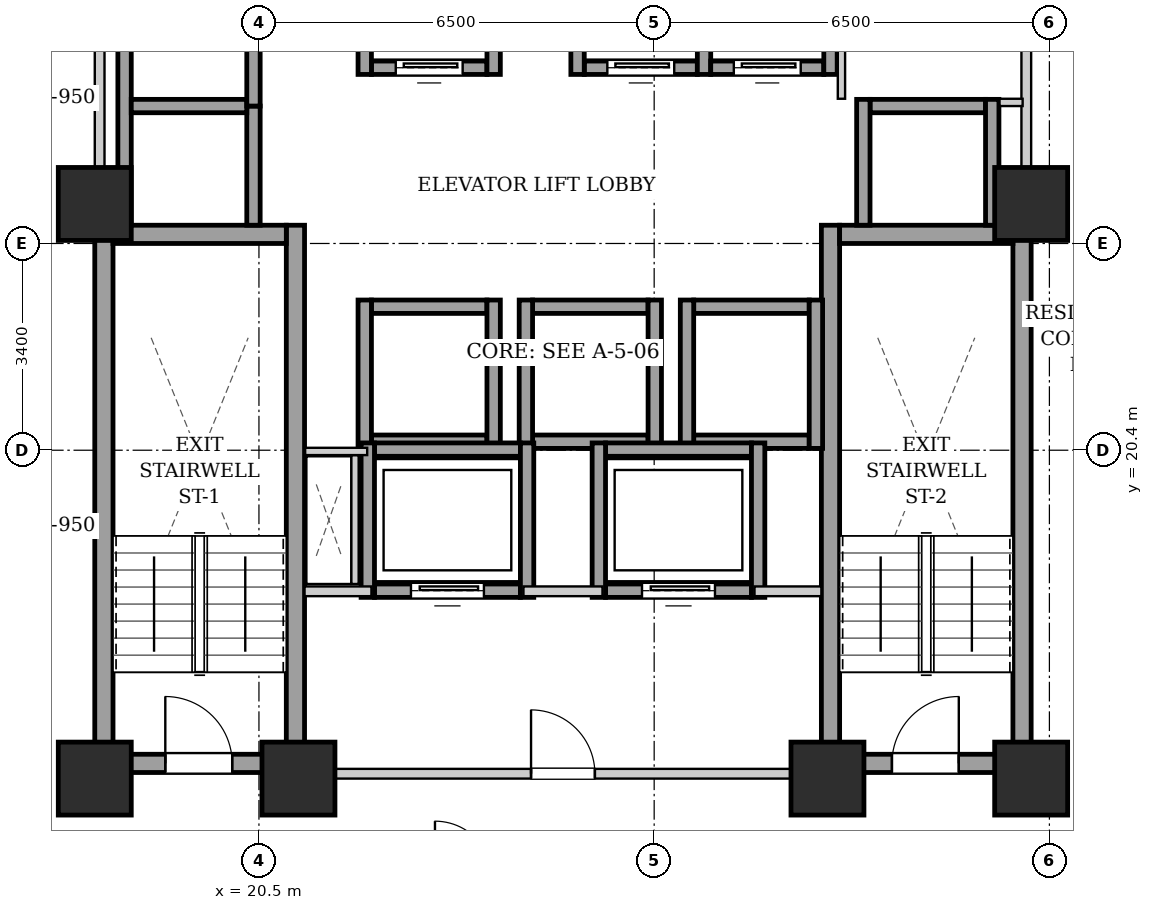
"""IFC4 building model, lengths in metres.
Left out: names, types, materials, properties, quantities, classifications, styles, units other than length and angle.
Written with IfcOpenShell. Run it as: python <this file> out.ifc"""

import sys

from ifc_helpers import new_model, si_unit, direction, frame, frame_2d, origin, origin_2d, place, context, subcontext, project, spatial, rectangle, extrude, element, fill, save


model = new_model("IFC4")
c1 = context("Model", 3, precision=1e-05, world=origin(), true_north=direction((0.0, 1.0)))
c2 = subcontext(c1, "Body", "Model", "MODEL_VIEW")
j1 = project(units=[si_unit("LENGTHUNIT", "METRE"), si_unit("PLANEANGLEUNIT", "RADIAN")], contexts=[c1])
p1 = place(None, origin())
s1 = spatial("IfcSite", under=j1, at=p1, CompositionType="ELEMENT")
p2 = place(p1, origin())
s2 = spatial("IfcBuilding", under=s1, at=p2, CompositionType="ELEMENT")
p3 = place(p2, frame((0.0, 0.0, 45.0)))
s3 = spatial("IfcBuildingStorey", under=s2, at=p3, CompositionType="ELEMENT", Elevation=45.0)
for number, where, z_axis, x_axis in (
    (1, (17.8, 15.0, 0.0), (0.0, 0.0, 1.0), (1.0, 0.0, 0.0)),
    (2, (21.15, 15.0, 0.0), (0.0, 0.0, 1.0), (1.0, 0.0, 0.0)),
    (3, (29.85, 15.0, 0.0), (0.0, 0.0, 1.0), (1.0, 0.0, 0.0)),
    (4, (33.2, 15.0, 0.0), (0.0, 0.0, 1.0), (1.0, 0.0, 0.0)),
    (5, (17.8, 24.45, 0.0), (0.0, 0.0, 1.0), (1.0, 0.0, 0.0)),
    (6, (33.2, 24.45, 0.0), (0.0, 0.0, 1.0), (1.0, 0.0, 0.0)),
):
    element("IfcColumn", number, at=place(p3, frame(where, z_axis=z_axis, x_axis=x_axis)), inside=s3, PredefinedType="COLUMN", context=c2, shape_type="SweptSolid", body=[
        extrude(rectangle(XDim=1.2, YDim=1.2, at=origin_2d()), origin(), (0.0, 0.0, 1.0), 3.2),
    ])
for number, where, z_axis, x_axis in (
    (7, (17.95, 15.1, 0.0), (0.0, 0.0, 1.0), (0.0, 1.0, 0.0)),
    (8, (21.1, 15.1, 0.0), (0.0, 0.0, 1.0), (0.0, 1.0, 0.0)),
):
    element("IfcWall", number, at=place(p3, frame(where, z_axis=z_axis, x_axis=x_axis)), inside=s3, PredefinedType="SHEAR", context=c2, shape_type="SweptSolid", body=[
        extrude(rectangle(XDim=9.0, YDim=0.3, at=frame_2d((4.5, 0.0))), origin(), (0.0, 0.0, 1.0), 2.94),
    ])
p4 = place(p3, frame((18.1, 23.95, 0.0), z_axis=(0.0, 0.0, 1.0), x_axis=(1.0, 0.0, 0.0)))
e9 = element("IfcWall", 9, at=p4, inside=s3, PredefinedType="SHEAR", context=c2, shape_type="SweptSolid", body=[
    extrude(rectangle(XDim=2.85, YDim=0.3, at=frame_2d((1.425, 0.0))), origin(), (0.0, 0.0, 1.0), 2.94),
])
p5 = place(p3, frame((18.1, 15.25, 0.0), z_axis=(0.0, 0.0, 1.0), x_axis=(1.0, 0.0, 0.0)))
e10 = element("IfcWall", 10, at=p5, inside=s3, PredefinedType="SHEAR", context=c2, shape_type="SweptSolid", body=[
    extrude(rectangle(XDim=2.85, YDim=0.3, at=frame_2d((1.425, 0.0))), origin(), (0.0, 0.0, 1.0), 2.94),
])
p6 = place(p5, frame((0.86, 0.0, 0.0)))
e11 = element("IfcOpeningElement", 11, at=p6, cuts=e10, PredefinedType="OPENING", context=c2, shape_type="SweptSolid", body=[
    extrude(rectangle(XDim=1.1, YDim=2.05, at=frame_2d((0.55, 1.025))), frame((0.0, 0.16, 0.0), z_axis=(0.0, -1.0, 0.0), x_axis=(1.0, 0.0, 0.0)), (0.0, 0.0, 1.0), 0.32),
])
for number, where, z_axis, x_axis in (
    (12, (29.9, 15.1, 0.0), (0.0, 0.0, 1.0), (0.0, 1.0, 0.0)),
    (13, (33.05, 15.1, 0.0), (0.0, 0.0, 1.0), (0.0, 1.0, 0.0)),
):
    element("IfcWall", number, at=place(p3, frame(where, z_axis=z_axis, x_axis=x_axis)), inside=s3, PredefinedType="SHEAR", context=c2, shape_type="SweptSolid", body=[
        extrude(rectangle(XDim=9.0, YDim=0.3, at=frame_2d((4.5, 0.0))), origin(), (0.0, 0.0, 1.0), 2.94),
    ])
p7 = place(p3, frame((30.05, 23.95, 0.0), z_axis=(0.0, 0.0, 1.0), x_axis=(1.0, 0.0, 0.0)))
e14 = element("IfcWall", 14, at=p7, inside=s3, PredefinedType="SHEAR", context=c2, shape_type="SweptSolid", body=[
    extrude(rectangle(XDim=2.85, YDim=0.3, at=frame_2d((1.425, 0.0))), origin(), (0.0, 0.0, 1.0), 2.94),
])
p8 = place(p3, frame((30.05, 15.25, 0.0), z_axis=(0.0, 0.0, 1.0), x_axis=(1.0, 0.0, 0.0)))
e15 = element("IfcWall", 15, at=p8, inside=s3, PredefinedType="SHEAR", context=c2, shape_type="SweptSolid", body=[
    extrude(rectangle(XDim=2.85, YDim=0.3, at=frame_2d((1.425, 0.0))), origin(), (0.0, 0.0, 1.0), 2.94),
])
p9 = place(p8, frame((0.86, 0.0, 0.0)))
e16 = element("IfcOpeningElement", 16, at=p9, cuts=e15, PredefinedType="OPENING", context=c2, shape_type="SweptSolid", body=[
    extrude(rectangle(XDim=1.1, YDim=2.05, at=frame_2d((0.55, 1.025))), frame((0.0, 0.16, 0.0), z_axis=(0.0, -1.0, 0.0), x_axis=(1.0, 0.0, 0.0)), (0.0, 0.0, 1.0), 0.32),
])
p10 = place(p3, frame((22.35, 26.69, 0.0), z_axis=(0.0, 0.0, 1.0), x_axis=(1.0, 0.0, 0.0)))
e17 = element("IfcWall", 17, at=p10, inside=s3, PredefinedType="SHEAR", context=c2, shape_type="SweptSolid", body=[
    extrude(rectangle(XDim=1.9, YDim=0.22, at=frame_2d((0.95, 0.0))), origin(), (0.0, 0.0, 1.0), 2.94),
])
p11 = place(p10, frame((0.4, 0.0, 0.0)))
e18 = element("IfcOpeningElement", 18, at=p11, cuts=e17, PredefinedType="OPENING", context=c2, shape_type="SweptSolid", body=[
    extrude(rectangle(XDim=1.1, YDim=2.15, at=frame_2d((0.55, 1.075))), frame((0.0, 0.12, 0.0), z_axis=(0.0, -1.0, 0.0), x_axis=(1.0, 0.0, 0.0)), (0.0, 0.0, 1.0), 0.24),
])
for number, where, z_axis, x_axis in (
    (19, (22.24, 26.58, 0.0), (0.0, 0.0, 1.0), (0.0, 1.0, 0.0)),
    (20, (24.36, 26.58, 0.0), (0.0, 0.0, 1.0), (0.0, 1.0, 0.0)),
):
    element("IfcWall", number, at=place(p3, frame(where, z_axis=z_axis, x_axis=x_axis)), inside=s3, PredefinedType="SHEAR", context=c2, shape_type="SweptSolid", body=[
        extrude(rectangle(XDim=2.44, YDim=0.22, at=frame_2d((1.22, 0.0))), origin(), (0.0, 0.0, 1.0), 2.94),
    ])
p12 = place(p3, frame((25.85, 26.69, 0.0), z_axis=(0.0, 0.0, 1.0), x_axis=(1.0, 0.0, 0.0)))
e21 = element("IfcWall", 21, at=p12, inside=s3, PredefinedType="SHEAR", context=c2, shape_type="SweptSolid", body=[
    extrude(rectangle(XDim=1.86, YDim=0.22, at=frame_2d((0.93, 0.0))), origin(), (0.0, 0.0, 1.0), 2.94),
])
p13 = place(p12, frame((0.38, 0.0, 0.0)))
e22 = element("IfcOpeningElement", 22, at=p13, cuts=e21, PredefinedType="OPENING", context=c2, shape_type="SweptSolid", body=[
    extrude(rectangle(XDim=1.1, YDim=2.15, at=frame_2d((0.55, 1.075))), frame((0.0, 0.12, 0.0), z_axis=(0.0, -1.0, 0.0), x_axis=(1.0, 0.0, 0.0)), (0.0, 0.0, 1.0), 0.24),
])
for number, where, z_axis, x_axis in (
    (23, (25.74, 26.58, 0.0), (0.0, 0.0, 1.0), (0.0, 1.0, 0.0)),
    (24, (27.82, 26.58, 0.0), (0.0, 0.0, 1.0), (0.0, 1.0, 0.0)),
):
    element("IfcWall", number, at=place(p3, frame(where, z_axis=z_axis, x_axis=x_axis)), inside=s3, PredefinedType="SHEAR", context=c2, shape_type="SweptSolid", body=[
        extrude(rectangle(XDim=2.44, YDim=0.22, at=frame_2d((1.22, 0.0))), origin(), (0.0, 0.0, 1.0), 2.94),
    ])
p14 = place(p3, frame((27.93, 26.69, 0.0), z_axis=(0.0, 0.0, 1.0), x_axis=(1.0, 0.0, 0.0)))
e25 = element("IfcWall", 25, at=p14, inside=s3, PredefinedType="SHEAR", context=c2, shape_type="SweptSolid", body=[
    extrude(rectangle(XDim=1.86, YDim=0.22, at=frame_2d((0.93, 0.0))), origin(), (0.0, 0.0, 1.0), 2.94),
])
p15 = place(p14, frame((0.38, 0.0, 0.0)))
e26 = element("IfcOpeningElement", 26, at=p15, cuts=e25, PredefinedType="OPENING", context=c2, shape_type="SweptSolid", body=[
    extrude(rectangle(XDim=1.1, YDim=2.15, at=frame_2d((0.55, 1.075))), frame((0.0, 0.12, 0.0), z_axis=(0.0, -1.0, 0.0), x_axis=(1.0, 0.0, 0.0)), (0.0, 0.0, 1.0), 0.24),
])
p16 = place(p3, frame((29.9, 26.58, 0.0), z_axis=(0.0, 0.0, 1.0), x_axis=(0.0, 1.0, 0.0)))
e27 = element("IfcWall", 27, at=p16, inside=s3, PredefinedType="SHEAR", context=c2, shape_type="SweptSolid", body=[
    extrude(rectangle(XDim=2.44, YDim=0.22, at=frame_2d((1.22, 0.0))), origin(), (0.0, 0.0, 1.0), 2.94),
])
for number, where, z_axis, x_axis in (
    (28, (22.35, 20.54, 0.0), (0.0, 0.0, 1.0), (1.0, 0.0, 0.0)),
    (29, (22.35, 22.76, 0.0), (0.0, 0.0, 1.0), (1.0, 0.0, 0.0)),
):
    element("IfcWall", number, at=place(p3, frame(where, z_axis=z_axis, x_axis=x_axis)), inside=s3, PredefinedType="SHEAR", context=c2, shape_type="SweptSolid", body=[
        extrude(rectangle(XDim=1.9, YDim=0.22, at=frame_2d((0.95, 0.0))), origin(), (0.0, 0.0, 1.0), 2.94),
    ])
for number, where, z_axis, x_axis in (
    (30, (22.24, 20.43, 0.0), (0.0, 0.0, 1.0), (0.0, 1.0, 0.0)),
    (31, (24.36, 20.43, 0.0), (0.0, 0.0, 1.0), (0.0, 1.0, 0.0)),
):
    element("IfcWall", number, at=place(p3, frame(where, z_axis=z_axis, x_axis=x_axis)), inside=s3, PredefinedType="SHEAR", context=c2, shape_type="SweptSolid", body=[
        extrude(rectangle(XDim=2.44, YDim=0.22, at=frame_2d((1.22, 0.0))), origin(), (0.0, 0.0, 1.0), 2.94),
    ])
for number, where, z_axis, x_axis in (
    (32, (25.0, 20.54, 0.0), (0.0, 0.0, 1.0), (1.0, 0.0, 0.0)),
    (33, (25.0, 22.76, 0.0), (0.0, 0.0, 1.0), (1.0, 0.0, 0.0)),
):
    element("IfcWall", number, at=place(p3, frame(where, z_axis=z_axis, x_axis=x_axis)), inside=s3, PredefinedType="SHEAR", context=c2, shape_type="SweptSolid", body=[
        extrude(rectangle(XDim=1.9, YDim=0.22, at=frame_2d((0.95, 0.0))), origin(), (0.0, 0.0, 1.0), 2.94),
    ])
for number, where, z_axis, x_axis in (
    (34, (24.89, 20.43, 0.0), (0.0, 0.0, 1.0), (0.0, 1.0, 0.0)),
    (35, (27.01, 20.43, 0.0), (0.0, 0.0, 1.0), (0.0, 1.0, 0.0)),
):
    element("IfcWall", number, at=place(p3, frame(where, z_axis=z_axis, x_axis=x_axis)), inside=s3, PredefinedType="SHEAR", context=c2, shape_type="SweptSolid", body=[
        extrude(rectangle(XDim=2.44, YDim=0.22, at=frame_2d((1.22, 0.0))), origin(), (0.0, 0.0, 1.0), 2.94),
    ])
for number, where, z_axis, x_axis in (
    (36, (27.65, 20.54, 0.0), (0.0, 0.0, 1.0), (1.0, 0.0, 0.0)),
    (37, (27.65, 22.76, 0.0), (0.0, 0.0, 1.0), (1.0, 0.0, 0.0)),
):
    element("IfcWall", number, at=place(p3, frame(where, z_axis=z_axis, x_axis=x_axis)), inside=s3, PredefinedType="SHEAR", context=c2, shape_type="SweptSolid", body=[
        extrude(rectangle(XDim=1.9, YDim=0.22, at=frame_2d((0.95, 0.0))), origin(), (0.0, 0.0, 1.0), 2.94),
    ])
for number, where, z_axis, x_axis in (
    (38, (27.54, 20.43, 0.0), (0.0, 0.0, 1.0), (0.0, 1.0, 0.0)),
    (39, (29.66, 20.43, 0.0), (0.0, 0.0, 1.0), (0.0, 1.0, 0.0)),
):
    element("IfcWall", number, at=place(p3, frame(where, z_axis=z_axis, x_axis=x_axis)), inside=s3, PredefinedType="SHEAR", context=c2, shape_type="SweptSolid", body=[
        extrude(rectangle(XDim=2.44, YDim=0.22, at=frame_2d((1.22, 0.0))), origin(), (0.0, 0.0, 1.0), 2.94),
    ])
p17 = place(p3, frame((18.29, 24.1, 0.0), z_axis=(0.0, 0.0, 1.0), x_axis=(0.0, 1.0, 0.0)))
e40 = element("IfcWall", 40, at=p17, inside=s3, PredefinedType="SHEAR", context=c2, shape_type="SweptSolid", body=[
    extrude(rectangle(XDim=4.14, YDim=0.22, at=frame_2d((2.07, 0.0))), origin(), (0.0, 0.0, 1.0), 2.94),
])
p18 = place(p3, frame((20.41, 24.1, 0.0), z_axis=(0.0, 0.0, 1.0), x_axis=(0.0, 1.0, 0.0)))
e41 = element("IfcWall", 41, at=p18, inside=s3, PredefinedType="SHEAR", context=c2, shape_type="SweptSolid", body=[
    extrude(rectangle(XDim=1.96, YDim=0.22, at=frame_2d((0.98, 0.0))), origin(), (0.0, 0.0, 1.0), 2.94),
])
p19 = place(p3, frame((18.4, 26.06, 0.0), z_axis=(0.0, 0.0, 1.0), x_axis=(1.0, 0.0, 0.0)))
e42 = element("IfcWall", 42, at=p19, inside=s3, PredefinedType="SHEAR", context=c2, shape_type="SweptSolid", body=[
    extrude(rectangle(XDim=1.9, YDim=0.22, at=frame_2d((0.95, 0.0))), origin(), (0.0, 0.0, 1.0), 2.94),
])
p20 = place(p3, frame((20.41, 26.06, 0.0), z_axis=(0.0, 0.0, 1.0), x_axis=(0.0, 1.0, 0.0)))
e43 = element("IfcWall", 43, at=p20, inside=s3, PredefinedType="SHEAR", context=c2, shape_type="SweptSolid", body=[
    extrude(rectangle(XDim=2.18, YDim=0.22, at=frame_2d((1.09, 0.0))), origin(), (0.0, 0.0, 1.0), 2.94),
])
p21 = place(p3, frame((30.55, 26.06, 0.0), z_axis=(0.0, 0.0, 1.0), x_axis=(1.0, 0.0, 0.0)))
e44 = element("IfcWall", 44, at=p21, inside=s3, PredefinedType="SHEAR", context=c2, shape_type="SweptSolid", body=[
    extrude(rectangle(XDim=1.9, YDim=0.22, at=frame_2d((0.95, 0.0))), origin(), (0.0, 0.0, 1.0), 2.94),
])
for number, where, z_axis, x_axis in (
    (45, (30.44, 24.1, 0.0), (0.0, 0.0, 1.0), (0.0, 1.0, 0.0)),
    (46, (32.56, 24.1, 0.0), (0.0, 0.0, 1.0), (0.0, 1.0, 0.0)),
):
    element("IfcWall", number, at=place(p3, frame(where, z_axis=z_axis, x_axis=x_axis)), inside=s3, PredefinedType="SHEAR", context=c2, shape_type="SweptSolid", body=[
        extrude(rectangle(XDim=2.07, YDim=0.22, at=frame_2d((1.035, 0.0))), origin(), (0.0, 0.0, 1.0), 2.94),
    ])
p22 = place(p3, frame((22.4, 18.09, 0.0), z_axis=(0.0, 0.0, 1.0), x_axis=(1.0, 0.0, 0.0)))
e47 = element("IfcWall", 47, at=p22, inside=s3, PredefinedType="SHEAR", context=c2, shape_type="SweptSolid", body=[
    extrude(rectangle(XDim=2.4, YDim=0.22, at=frame_2d((1.2, 0.0))), origin(), (0.0, 0.0, 1.0), 2.94),
])
p23 = place(p22, frame((0.6, 0.0, 0.0)))
e48 = element("IfcOpeningElement", 48, at=p23, cuts=e47, PredefinedType="OPENING", context=c2, shape_type="SweptSolid", body=[
    extrude(rectangle(XDim=1.2, YDim=2.15, at=frame_2d((0.6, 1.075))), frame((0.0, 0.12, 0.0), z_axis=(0.0, -1.0, 0.0), x_axis=(1.0, 0.0, 0.0)), (0.0, 0.0, 1.0), 0.24),
])
p24 = place(p3, frame((22.4, 20.41, 0.0), z_axis=(0.0, 0.0, 1.0), x_axis=(1.0, 0.0, 0.0)))
e49 = element("IfcWall", 49, at=p24, inside=s3, PredefinedType="SHEAR", context=c2, shape_type="SweptSolid", body=[
    extrude(rectangle(XDim=2.4, YDim=0.22, at=frame_2d((1.2, 0.0))), origin(), (0.0, 0.0, 1.0), 2.94),
])
for number, where, z_axis, x_axis in (
    (50, (22.29, 17.98, 0.0), (0.0, 0.0, 1.0), (0.0, 1.0, 0.0)),
    (51, (24.91, 17.98, 0.0), (0.0, 0.0, 1.0), (0.0, 1.0, 0.0)),
):
    element("IfcWall", number, at=place(p3, frame(where, z_axis=z_axis, x_axis=x_axis)), inside=s3, PredefinedType="SHEAR", context=c2, shape_type="SweptSolid", body=[
        extrude(rectangle(XDim=2.54, YDim=0.22, at=frame_2d((1.27, 0.0))), origin(), (0.0, 0.0, 1.0), 2.94),
    ])
p25 = place(p3, frame((26.2, 18.09, 0.0), z_axis=(0.0, 0.0, 1.0), x_axis=(1.0, 0.0, 0.0)))
e52 = element("IfcWall", 52, at=p25, inside=s3, PredefinedType="SHEAR", context=c2, shape_type="SweptSolid", body=[
    extrude(rectangle(XDim=2.4, YDim=0.22, at=frame_2d((1.2, 0.0))), origin(), (0.0, 0.0, 1.0), 2.94),
])
p26 = place(p25, frame((0.6, 0.0, 0.0)))
e53 = element("IfcOpeningElement", 53, at=p26, cuts=e52, PredefinedType="OPENING", context=c2, shape_type="SweptSolid", body=[
    extrude(rectangle(XDim=1.2, YDim=2.15, at=frame_2d((0.6, 1.075))), frame((0.0, 0.12, 0.0), z_axis=(0.0, -1.0, 0.0), x_axis=(1.0, 0.0, 0.0)), (0.0, 0.0, 1.0), 0.24),
])
p27 = place(p3, frame((26.2, 20.41, 0.0), z_axis=(0.0, 0.0, 1.0), x_axis=(1.0, 0.0, 0.0)))
e54 = element("IfcWall", 54, at=p27, inside=s3, PredefinedType="SHEAR", context=c2, shape_type="SweptSolid", body=[
    extrude(rectangle(XDim=2.4, YDim=0.22, at=frame_2d((1.2, 0.0))), origin(), (0.0, 0.0, 1.0), 2.94),
])
for number, where, z_axis, x_axis in (
    (55, (26.09, 17.98, 0.0), (0.0, 0.0, 1.0), (0.0, 1.0, 0.0)),
    (56, (28.71, 17.98, 0.0), (0.0, 0.0, 1.0), (0.0, 1.0, 0.0)),
):
    element("IfcWall", number, at=place(p3, frame(where, z_axis=z_axis, x_axis=x_axis)), inside=s3, PredefinedType="SHEAR", context=c2, shape_type="SweptSolid", body=[
        extrude(rectangle(XDim=2.54, YDim=0.22, at=frame_2d((1.27, 0.0))), origin(), (0.0, 0.0, 1.0), 2.94),
    ])
p28 = place(p3, frame((21.25, 15.08, 0.0), z_axis=(0.0, 0.0, 1.0), x_axis=(1.0, 0.0, 0.0)))
e57 = element("IfcWall", 57, at=p28, inside=s3, PredefinedType="PARTITIONING", context=c2, shape_type="SweptSolid", body=[
    extrude(rectangle(XDim=8.5, YDim=0.16, at=frame_2d((4.25, 0.0))), origin(), (0.0, 0.0, 1.0), 2.155),
])
p29 = place(p28, frame((3.725, 0.0, 0.0)))
e58 = element("IfcOpeningElement", 58, at=p29, cuts=e57, PredefinedType="OPENING", context=c2, shape_type="SweptSolid", body=[
    extrude(rectangle(XDim=1.05, YDim=2.05, at=frame_2d((0.525, 1.025))), frame((0.0, 0.09, 0.0), z_axis=(0.0, -1.0, 0.0), x_axis=(1.0, 0.0, 0.0)), (0.0, 0.0, 1.0), 0.18),
])
p30 = place(p3, frame((21.25, 18.08, 0.0), z_axis=(0.0, 0.0, 1.0), x_axis=(1.0, 0.0, 0.0)))
e59 = element("IfcWall", 59, at=p30, inside=s3, PredefinedType="PARTITIONING", context=c2, shape_type="SweptSolid", body=[
    extrude(rectangle(XDim=1.1, YDim=0.16, at=frame_2d((0.55, 0.0))), origin(), (0.0, 0.0, 1.0), 2.94),
])
p31 = place(p3, frame((24.85, 18.08, 0.0), z_axis=(0.0, 0.0, 1.0), x_axis=(1.0, 0.0, 0.0)))
e60 = element("IfcWall", 60, at=p31, inside=s3, PredefinedType="PARTITIONING", context=c2, shape_type="SweptSolid", body=[
    extrude(rectangle(XDim=1.3, YDim=0.16, at=frame_2d((0.65, 0.0))), origin(), (0.0, 0.0, 1.0), 2.94),
])
p32 = place(p3, frame((28.65, 18.08, 0.0), z_axis=(0.0, 0.0, 1.0), x_axis=(1.0, 0.0, 0.0)))
e61 = element("IfcWall", 61, at=p32, inside=s3, PredefinedType="PARTITIONING", context=c2, shape_type="SweptSolid", body=[
    extrude(rectangle(XDim=1.1, YDim=0.16, at=frame_2d((0.55, 0.0))), origin(), (0.0, 0.0, 1.0), 2.94),
])
for number, where, z_axis, x_axis in (
    (62, (17.88, 24.12, 0.0), (0.0, 0.0, 1.0), (0.0, 1.0, 0.0)),
    (63, (33.12, 24.12, 0.0), (0.0, 0.0, 1.0), (0.0, 1.0, 0.0)),
):
    element("IfcWall", number, at=place(p3, frame(where, z_axis=z_axis, x_axis=x_axis)), inside=s3, PredefinedType="PARTITIONING", context=c2, shape_type="SweptSolid", body=[
        extrude(rectangle(XDim=4.76, YDim=0.16, at=frame_2d((2.38, 0.0))), origin(), (0.0, 0.0, 1.0), 2.94),
    ])
p33 = place(p3, frame((22.08, 18.2, 0.0), z_axis=(0.0, 0.0, 1.0), x_axis=(0.0, 1.0, 0.0)))
e64 = element("IfcWall", 64, at=p33, inside=s3, PredefinedType="PARTITIONING", context=c2, shape_type="SweptSolid", body=[
    extrude(rectangle(XDim=2.12, YDim=0.12, at=frame_2d((1.06, 0.0))), origin(), (0.0, 0.0, 1.0), 2.94),
])
p34 = place(p3, frame((22.28, 20.38, 0.0), z_axis=(0.0, 0.0, 1.0), x_axis=(-1.0, 0.0, 0.0)))
e65 = element("IfcWall", 65, at=p34, inside=s3, PredefinedType="PARTITIONING", context=c2, shape_type="SweptSolid", body=[
    extrude(rectangle(XDim=1.02, YDim=0.12, at=frame_2d((0.51, 0.0))), origin(), (0.0, 0.0, 1.0), 2.94),
])
p35 = place(p3, frame((30.08, 26.18, 0.0), z_axis=(0.0, 0.0, 1.0), x_axis=(0.0, 1.0, 0.0)))
e66 = element("IfcWall", 66, at=p35, inside=s3, PredefinedType="PARTITIONING", context=c2, shape_type="SweptSolid", body=[
    extrude(rectangle(XDim=2.68, YDim=0.12, at=frame_2d((1.34, 0.0))), origin(), (0.0, 0.0, 1.0), 2.94),
])
p36 = place(p3, frame((32.68, 26.12, 0.0), z_axis=(0.0, 0.0, 1.0), x_axis=(1.0, 0.0, 0.0)))
e67 = element("IfcWall", 67, at=p36, inside=s3, PredefinedType="PARTITIONING", context=c2, shape_type="SweptSolid", body=[
    extrude(rectangle(XDim=0.38, YDim=0.12, at=frame_2d((0.19, 0.0))), origin(), (0.0, 0.0, 1.0), 2.94),
])
p37 = place(p6, origin())
e68 = element("IfcDoor", 68, at=p37, inside=s3, OperationType="SINGLE_SWING_LEFT", PredefinedType="DOOR", context=c2, shape_type="SweptSolid", body=[
    extrude(rectangle(XDim=1.1, YDim=2.05, at=frame_2d((0.55, 1.025))), frame((0.0, 0.025, 0.0), z_axis=(0.0, -1.0, 0.0), x_axis=(1.0, 0.0, 0.0)), (0.0, 0.0, 1.0), 0.05),
])
fill(e11, e68)
p38 = place(p9, origin())
e69 = element("IfcDoor", 69, at=p38, inside=s3, OperationType="SINGLE_SWING_RIGHT", PredefinedType="DOOR", context=c2, shape_type="SweptSolid", body=[
    extrude(rectangle(XDim=1.1, YDim=2.05, at=frame_2d((0.55, 1.025))), frame((0.0, 0.025, 0.0), z_axis=(0.0, -1.0, 0.0), x_axis=(1.0, 0.0, 0.0)), (0.0, 0.0, 1.0), 0.05),
])
fill(e16, e69)
p39 = place(p11, origin())
e70 = element("IfcDoor", 70, at=p39, inside=s3, OperationType="SLIDING_TO_LEFT", PredefinedType="DOOR", context=c2, shape_type="SweptSolid", body=[
    extrude(rectangle(XDim=1.1, YDim=2.15, at=frame_2d((0.55, 1.075))), frame((0.0, 0.025, 0.0), z_axis=(0.0, -1.0, 0.0), x_axis=(1.0, 0.0, 0.0)), (0.0, 0.0, 1.0), 0.05),
])
fill(e18, e70)
p40 = place(p13, origin())
e71 = element("IfcDoor", 71, at=p40, inside=s3, OperationType="SLIDING_TO_LEFT", PredefinedType="DOOR", context=c2, shape_type="SweptSolid", body=[
    extrude(rectangle(XDim=1.1, YDim=2.15, at=frame_2d((0.55, 1.075))), frame((0.0, 0.025, 0.0), z_axis=(0.0, -1.0, 0.0), x_axis=(1.0, 0.0, 0.0)), (0.0, 0.0, 1.0), 0.05),
])
fill(e22, e71)
p41 = place(p15, origin())
e72 = element("IfcDoor", 72, at=p41, inside=s3, OperationType="SLIDING_TO_LEFT", PredefinedType="DOOR", context=c2, shape_type="SweptSolid", body=[
    extrude(rectangle(XDim=1.1, YDim=2.15, at=frame_2d((0.55, 1.075))), frame((0.0, 0.025, 0.0), z_axis=(0.0, -1.0, 0.0), x_axis=(1.0, 0.0, 0.0)), (0.0, 0.0, 1.0), 0.05),
])
fill(e26, e72)
p42 = place(p23, origin())
e73 = element("IfcDoor", 73, at=p42, inside=s3, OperationType="SLIDING_TO_LEFT", PredefinedType="DOOR", context=c2, shape_type="SweptSolid", body=[
    extrude(rectangle(XDim=1.2, YDim=2.15, at=frame_2d((0.6, 1.075))), frame((0.0, 0.025, 0.0), z_axis=(0.0, -1.0, 0.0), x_axis=(1.0, 0.0, 0.0)), (0.0, 0.0, 1.0), 0.05),
])
fill(e48, e73)
p43 = place(p26, origin())
e74 = element("IfcDoor", 74, at=p43, inside=s3, OperationType="SLIDING_TO_LEFT", PredefinedType="DOOR", context=c2, shape_type="SweptSolid", body=[
    extrude(rectangle(XDim=1.2, YDim=2.15, at=frame_2d((0.6, 1.075))), frame((0.0, 0.025, 0.0), z_axis=(0.0, -1.0, 0.0), x_axis=(1.0, 0.0, 0.0)), (0.0, 0.0, 1.0), 0.05),
])
fill(e53, e74)
p44 = place(p29, origin())
e75 = element("IfcDoor", 75, at=p44, inside=s3, OperationType="SINGLE_SWING_LEFT", PredefinedType="DOOR", context=c2, shape_type="SweptSolid", body=[
    extrude(rectangle(XDim=1.05, YDim=2.05, at=frame_2d((0.525, 1.025))), frame((0.0, 0.025, 0.0), z_axis=(0.0, -1.0, 0.0), x_axis=(1.0, 0.0, 0.0)), (0.0, 0.0, 1.0), 0.05),
])
fill(e58, e75)
save(model, sys.argv[1])
